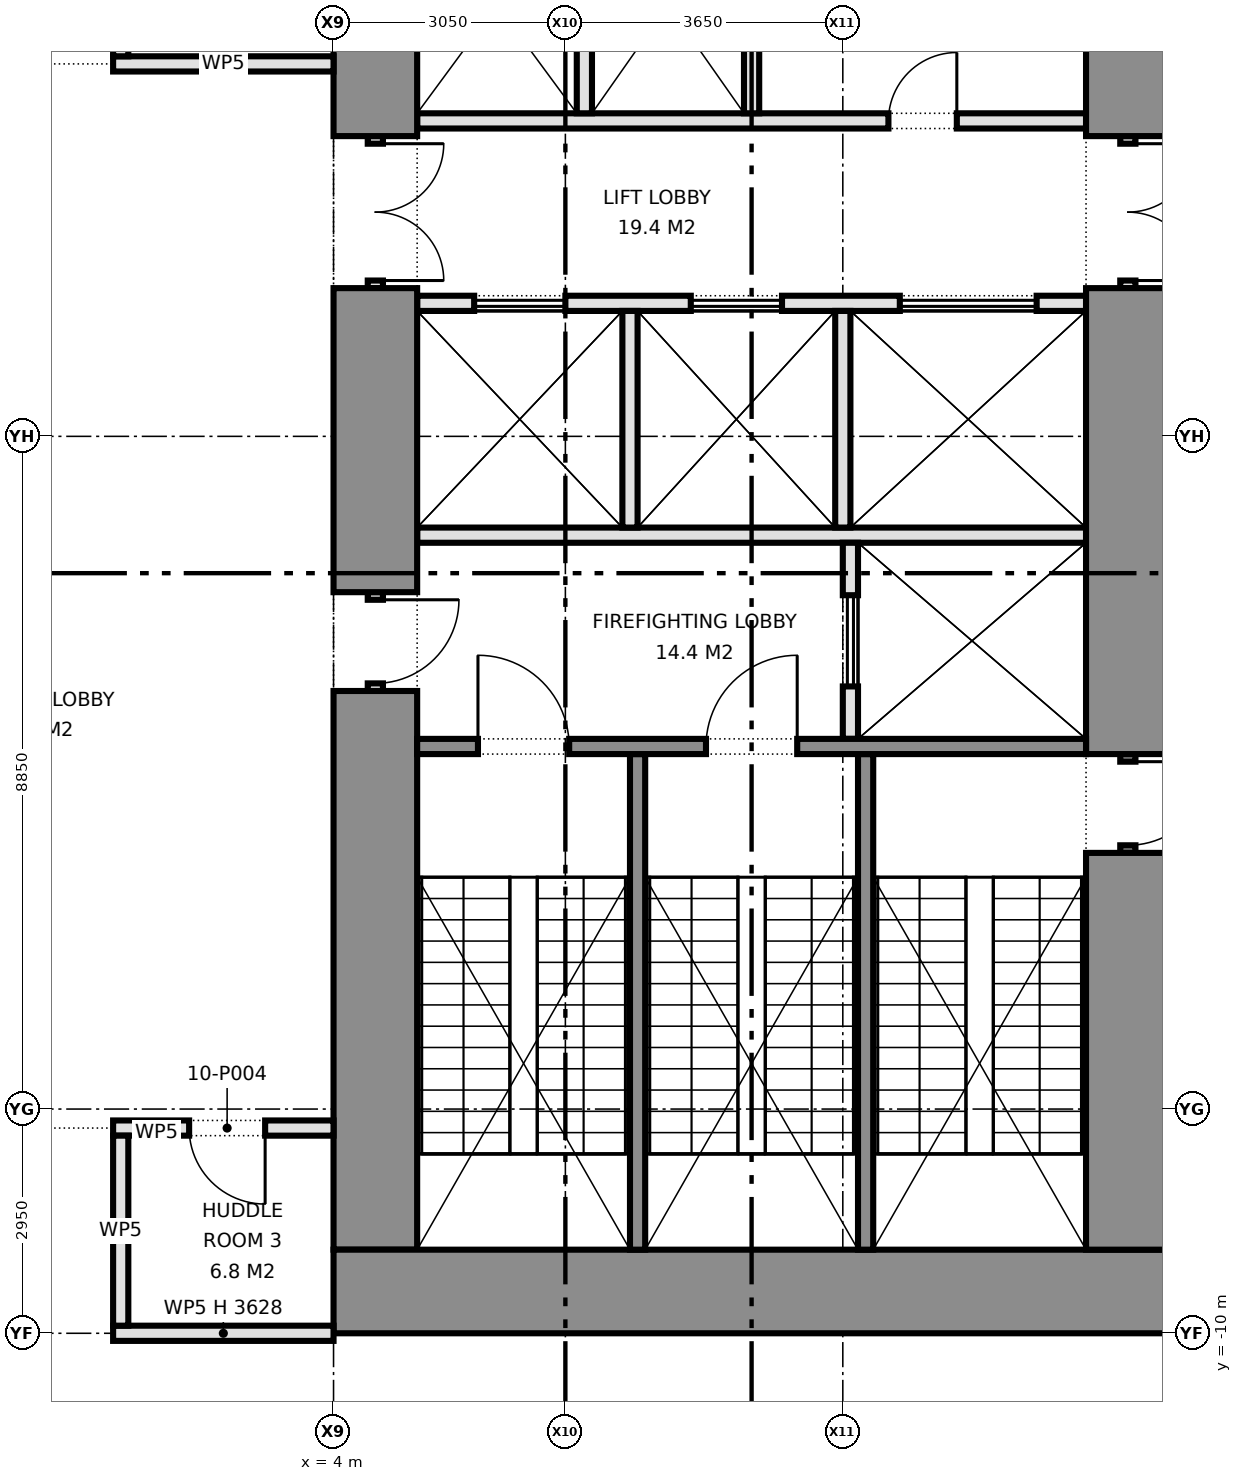
"""IFC4 building model, lengths in metres.
Left out: names, types, materials, properties, quantities, classifications, styles, units other than length and angle.
Written with IfcOpenShell. Run it as: python <this file> out.ifc"""

import sys

from ifc_helpers import new_model, si_unit, direction, frame, frame_2d, origin, place, context, subcontext, project, spatial, rectangle, extrude, element, fill, save


model = new_model("IFC4")
c1 = context("Model", 3, precision=1e-05, world=origin(), true_north=direction((0.0, 1.0)))
c2 = subcontext(c1, "Body", "Model", "MODEL_VIEW")
j1 = project(units=[si_unit("LENGTHUNIT", "METRE"), si_unit("PLANEANGLEUNIT", "RADIAN")], contexts=[c1])
p1 = place(None, origin())
s1 = spatial("IfcSite", under=j1, at=p1, CompositionType="ELEMENT")
p2 = place(p1, origin())
s2 = spatial("IfcBuilding", under=s1, at=p2, CompositionType="ELEMENT")
p3 = place(p2, frame((0.0, 0.0, 44.9)))
s3 = spatial("IfcBuildingStorey", under=s2, at=p3, CompositionType="ELEMENT", Elevation=44.9)
p4 = place(p3, frame((15.0, -9.45, 0.0), z_axis=(0.0, 0.0, 1.0), x_axis=(-1.0, 0.0, 0.0)))
e1 = element("IfcWall", 1, at=p4, inside=s3, PredefinedType="SHEAR", context=c2, shape_type="SweptSolid", body=[
    extrude(rectangle(XDim=11.0, YDim=1.1, at=frame_2d((5.5, 0.0))), origin(), (0.0, 0.0, 1.0), 4.575),
])
p5 = place(p3, frame((14.45, 8.9, 0.0), z_axis=(0.0, 0.0, 1.0), x_axis=(0.0, -1.0, 0.0)))
e2 = element("IfcWall", 2, at=p5, inside=s3, PredefinedType="SHEAR", context=c2, shape_type="SweptSolid", body=[
    extrude(rectangle(XDim=3.15, YDim=1.1, at=frame_2d((1.575, 0.0))), origin(), (0.0, 0.0, 1.0), 4.575),
])
p6 = place(p3, frame((14.45, 5.75, 0.0), z_axis=(0.0, 0.0, 1.0), x_axis=(0.0, -1.0, 0.0)))
e3 = element("IfcWall", 3, at=p6, inside=s3, PredefinedType="PARTITIONING", context=c2, shape_type="SweptSolid", body=[
    extrude(rectangle(XDim=2.0, YDim=0.2, at=frame_2d((1.0, 0.0))), origin(), (0.0, 0.0, 1.0), 2.4),
])
p7 = place(p6, frame((0.1, 0.0, 0.0)))
e4 = element("IfcOpeningElement", 4, at=p7, cuts=e3, PredefinedType="OPENING", context=c2, shape_type="SweptSolid", body=[
    extrude(rectangle(XDim=1.8, YDim=2.1, at=frame_2d((0.9, 1.05))), frame((0.0, 0.11, 0.0), z_axis=(0.0, -1.0, 0.0), x_axis=(1.0, 0.0, 0.0)), (0.0, 0.0, 1.0), 0.22),
])
p8 = place(p3, frame((14.45, 3.75, 0.0), z_axis=(0.0, 0.0, 1.0), x_axis=(0.0, -1.0, 0.0)))
e5 = element("IfcWall", 5, at=p8, inside=s3, PredefinedType="SHEAR", context=c2, shape_type="SweptSolid", body=[
    extrude(rectangle(XDim=6.13, YDim=1.1, at=frame_2d((3.065, 0.0))), origin(), (0.0, 0.0, 1.0), 4.575),
])
p9 = place(p3, frame((14.45, -2.38, 0.0), z_axis=(0.0, 0.0, 1.0), x_axis=(0.0, -1.0, 0.0)))
e6 = element("IfcWall", 6, at=p9, inside=s3, PredefinedType="SHEAR", context=c2, shape_type="SweptSolid", body=[
    extrude(rectangle(XDim=1.3, YDim=0.2, at=frame_2d((0.65, 0.0))), origin(), (0.0, 0.0, 1.0), 2.4),
])
p10 = place(p9, frame((0.1, 0.0, 0.0)))
e7 = element("IfcOpeningElement", 7, at=p10, cuts=e6, PredefinedType="OPENING", context=c2, shape_type="SweptSolid", body=[
    extrude(rectangle(XDim=1.1, YDim=2.1, at=frame_2d((0.55, 1.05))), frame((0.0, 0.11, 0.0), z_axis=(0.0, -1.0, 0.0), x_axis=(1.0, 0.0, 0.0)), (0.0, 0.0, 1.0), 0.22),
])
p11 = place(p3, frame((14.45, -3.68, 0.0), z_axis=(0.0, 0.0, 1.0), x_axis=(0.0, -1.0, 0.0)))
e8 = element("IfcWall", 8, at=p11, inside=s3, PredefinedType="SHEAR", context=c2, shape_type="SweptSolid", body=[
    extrude(rectangle(XDim=5.22, YDim=1.1, at=frame_2d((2.61, 0.0))), origin(), (0.0, 0.0, 1.0), 4.575),
])
p12 = place(p3, frame((4.55, 8.9, 0.0), z_axis=(0.0, 0.0, 1.0), x_axis=(0.0, -1.0, 0.0)))
e9 = element("IfcWall", 9, at=p12, inside=s3, PredefinedType="SHEAR", context=c2, shape_type="SweptSolid", body=[
    extrude(rectangle(XDim=3.15, YDim=1.1, at=frame_2d((1.575, 0.0))), origin(), (0.0, 0.0, 1.0), 4.575),
])
p13 = place(p3, frame((4.55, 5.75, 0.0), z_axis=(0.0, 0.0, 1.0), x_axis=(0.0, -1.0, 0.0)))
e10 = element("IfcWall", 10, at=p13, inside=s3, PredefinedType="PARTITIONING", context=c2, shape_type="SweptSolid", body=[
    extrude(rectangle(XDim=2.0, YDim=0.2, at=frame_2d((1.0, 0.0))), origin(), (0.0, 0.0, 1.0), 2.4),
])
p14 = place(p13, frame((0.1, 0.0, 0.0)))
e11 = element("IfcOpeningElement", 11, at=p14, cuts=e10, PredefinedType="OPENING", context=c2, shape_type="SweptSolid", body=[
    extrude(rectangle(XDim=1.8, YDim=2.1, at=frame_2d((0.9, 1.05))), frame((0.0, 0.11, 0.0), z_axis=(0.0, -1.0, 0.0), x_axis=(1.0, 0.0, 0.0)), (0.0, 0.0, 1.0), 0.22),
])
p15 = place(p3, frame((4.55, 3.75, 0.0), z_axis=(0.0, 0.0, 1.0), x_axis=(0.0, -1.0, 0.0)))
e12 = element("IfcWall", 12, at=p15, inside=s3, PredefinedType="SHEAR", context=c2, shape_type="SweptSolid", body=[
    extrude(rectangle(XDim=4.0, YDim=1.1, at=frame_2d((2.0, 0.0))), origin(), (0.0, 0.0, 1.0), 4.575),
])
p16 = place(p3, frame((4.55, -0.25, 0.0), z_axis=(0.0, 0.0, 1.0), x_axis=(0.0, -1.0, 0.0)))
e13 = element("IfcWall", 13, at=p16, inside=s3, PredefinedType="PARTITIONING", context=c2, shape_type="SweptSolid", body=[
    extrude(rectangle(XDim=1.3, YDim=0.2, at=frame_2d((0.65, 0.0))), origin(), (0.0, 0.0, 1.0), 2.4),
])
p17 = place(p16, frame((0.1, 0.0, 0.0)))
e14 = element("IfcOpeningElement", 14, at=p17, cuts=e13, PredefinedType="OPENING", context=c2, shape_type="SweptSolid", body=[
    extrude(rectangle(XDim=1.1, YDim=2.1, at=frame_2d((0.55, 1.05))), frame((0.0, 0.11, 0.0), z_axis=(0.0, -1.0, 0.0), x_axis=(1.0, 0.0, 0.0)), (0.0, 0.0, 1.0), 0.22),
])
p18 = place(p3, frame((4.55, -1.55, 0.0), z_axis=(0.0, 0.0, 1.0), x_axis=(0.0, -1.0, 0.0)))
e15 = element("IfcWall", 15, at=p18, inside=s3, PredefinedType="SHEAR", context=c2, shape_type="SweptSolid", body=[
    extrude(rectangle(XDim=7.35, YDim=1.1, at=frame_2d((3.675, 0.0))), origin(), (0.0, 0.0, 1.0), 4.575),
])
p19 = place(p3, frame((13.9, 5.95, 0.0), z_axis=(0.0, 0.0, 1.0), x_axis=(-1.0, 0.0, 0.0)))
e16 = element("IfcWall", 16, at=p19, inside=s3, PredefinedType="PARTITIONING", context=c2, shape_type="SweptSolid", body=[
    extrude(rectangle(XDim=8.8, YDim=0.2, at=frame_2d((4.4, 0.0))), origin(), (0.0, 0.0, 1.0), 4.575),
])
p20 = place(p19, frame((1.7, 0.0, 0.0)))
e17 = element("IfcOpeningElement", 17, at=p20, cuts=e16, PredefinedType="OPENING", context=c2, shape_type="SweptSolid", body=[
    extrude(rectangle(XDim=0.9, YDim=2.1, at=frame_2d((0.45, 1.05))), frame((0.0, 0.11, 0.0), z_axis=(0.0, -1.0, 0.0), x_axis=(1.0, 0.0, 0.0)), (0.0, 0.0, 1.0), 0.22),
])
p21 = place(p3, frame((13.9, 3.55, 0.0), z_axis=(0.0, 0.0, 1.0), x_axis=(-1.0, 0.0, 0.0)))
e18 = element("IfcWall", 18, at=p21, inside=s3, PredefinedType="PARTITIONING", context=c2, shape_type="SweptSolid", body=[
    extrude(rectangle(XDim=8.8, YDim=0.2, at=frame_2d((4.4, 0.0))), origin(), (0.0, 0.0, 1.0), 4.575),
])
p22 = place(p21, frame((0.65, 0.0, 0.0)))
e19 = element("IfcOpeningElement", 19, at=p22, cuts=e18, PredefinedType="OPENING", context=c2, shape_type="SweptSolid", body=[
    extrude(rectangle(XDim=1.8, YDim=2.1, at=frame_2d((0.9, 1.05))), frame((0.0, 0.11, 0.0), z_axis=(0.0, -1.0, 0.0), x_axis=(1.0, 0.0, 0.0)), (0.0, 0.0, 1.0), 0.22),
])
p23 = place(p21, frame((4.0, 0.0, 0.0)))
e20 = element("IfcOpeningElement", 20, at=p23, cuts=e18, PredefinedType="OPENING", context=c2, shape_type="SweptSolid", body=[
    extrude(rectangle(XDim=1.2, YDim=2.1, at=frame_2d((0.6, 1.05))), frame((0.0, 0.11, 0.0), z_axis=(0.0, -1.0, 0.0), x_axis=(1.0, 0.0, 0.0)), (0.0, 0.0, 1.0), 0.22),
])
p24 = place(p21, frame((6.85, 0.0, 0.0)))
e21 = element("IfcOpeningElement", 21, at=p24, cuts=e18, PredefinedType="OPENING", context=c2, shape_type="SweptSolid", body=[
    extrude(rectangle(XDim=1.2, YDim=2.1, at=frame_2d((0.6, 1.05))), frame((0.0, 0.11, 0.0), z_axis=(0.0, -1.0, 0.0), x_axis=(1.0, 0.0, 0.0)), (0.0, 0.0, 1.0), 0.22),
])
p25 = place(p3, frame((13.9, 0.5, 0.0), z_axis=(0.0, 0.0, 1.0), x_axis=(-1.0, 0.0, 0.0)))
e22 = element("IfcWall", 22, at=p25, inside=s3, PredefinedType="PARTITIONING", context=c2, shape_type="SweptSolid", body=[
    extrude(rectangle(XDim=8.8, YDim=0.2, at=frame_2d((4.4, 0.0))), origin(), (0.0, 0.0, 1.0), 4.575),
])
p26 = place(p3, frame((10.8, 0.4, 0.0), z_axis=(0.0, 0.0, 1.0), x_axis=(0.0, -1.0, 0.0)))
e23 = element("IfcWall", 23, at=p26, inside=s3, PredefinedType="PARTITIONING", context=c2, shape_type="SweptSolid", body=[
    extrude(rectangle(XDim=2.58, YDim=0.2, at=frame_2d((1.29, 0.0))), origin(), (0.0, 0.0, 1.0), 4.575),
])
p27 = place(p26, frame((0.69, 0.0, 0.0)))
e24 = element("IfcOpeningElement", 24, at=p27, cuts=e23, PredefinedType="OPENING", context=c2, shape_type="SweptSolid", body=[
    extrude(rectangle(XDim=1.2, YDim=2.1, at=frame_2d((0.6, 1.05))), frame((0.0, 0.11, 0.0), z_axis=(0.0, -1.0, 0.0), x_axis=(1.0, 0.0, 0.0)), (0.0, 0.0, 1.0), 0.22),
])
p28 = place(p3, frame((13.9, -2.28, 0.0), z_axis=(0.0, 0.0, 1.0), x_axis=(-1.0, 0.0, 0.0)))
e25 = element("IfcWall", 25, at=p28, inside=s3, PredefinedType="SHEAR", context=c2, shape_type="SweptSolid", body=[
    extrude(rectangle(XDim=8.8, YDim=0.2, at=frame_2d((4.4, 0.0))), origin(), (0.0, 0.0, 1.0), 4.575),
])
p29 = place(p28, frame((3.8, 0.0, 0.0)))
e26 = element("IfcOpeningElement", 26, at=p29, cuts=e25, PredefinedType="OPENING", context=c2, shape_type="SweptSolid", body=[
    extrude(rectangle(XDim=1.2, YDim=2.1, at=frame_2d((0.6, 1.05))), frame((0.0, 0.11, 0.0), z_axis=(0.0, -1.0, 0.0), x_axis=(1.0, 0.0, 0.0)), (0.0, 0.0, 1.0), 0.22),
])
p30 = place(p28, frame((6.8, 0.0, 0.0)))
e27 = element("IfcOpeningElement", 27, at=p30, cuts=e25, PredefinedType="OPENING", context=c2, shape_type="SweptSolid", body=[
    extrude(rectangle(XDim=1.2, YDim=2.1, at=frame_2d((0.6, 1.05))), frame((0.0, 0.11, 0.0), z_axis=(0.0, -1.0, 0.0), x_axis=(1.0, 0.0, 0.0)), (0.0, 0.0, 1.0), 0.22),
])
for number, where, z_axis, x_axis in (
    (28, (11.0, -2.38, 0.0), (0.0, 0.0, 1.0), (0.0, -1.0, 0.0)),
    (29, (8.0, -2.38, 0.0), (0.0, 0.0, 1.0), (0.0, -1.0, 0.0)),
):
    element("IfcWall", number, at=place(p3, frame(where, z_axis=z_axis, x_axis=x_axis)), inside=s3, PredefinedType="SHEAR", context=c2, shape_type="SweptSolid", body=[
        extrude(rectangle(XDim=6.52, YDim=0.2, at=frame_2d((3.26, 0.0))), origin(), (0.0, 0.0, 1.0), 4.575),
    ])
for number, where, z_axis, x_axis in (
    (30, (9.5, 8.9, 0.0), (0.0, 0.0, 1.0), (0.0, -1.0, 0.0)),
    (31, (7.3, 8.9, 0.0), (0.0, 0.0, 1.0), (0.0, -1.0, 0.0)),
    (32, (10.7, 3.45, 0.0), (0.0, 0.0, 1.0), (0.0, -1.0, 0.0)),
    (33, (7.9, 3.45, 0.0), (0.0, 0.0, 1.0), (0.0, -1.0, 0.0)),
):
    element("IfcWall", number, at=place(p3, frame(where, z_axis=z_axis, x_axis=x_axis)), inside=s3, PredefinedType="PARTITIONING", context=c2, shape_type="SweptSolid", body=[
        extrude(rectangle(XDim=2.85, YDim=0.2, at=frame_2d((1.425, 0.0))), origin(), (0.0, 0.0, 1.0), 4.575),
    ])
p31 = place(p3, frame((1.1, -10.0, 0.0), z_axis=(0.0, 0.0, 1.0), x_axis=(1.0, 0.0, 0.0)))
e34 = element("IfcWall", 34, at=p31, inside=s3, PredefinedType="PARTITIONING", context=c2, shape_type="SweptSolid", body=[
    extrude(rectangle(XDim=2.9, YDim=0.2, at=frame_2d((1.45, 0.0))), origin(), (0.0, 0.0, 1.0), 3.628),
])
p32 = place(p3, frame((1.1, -7.3, 0.0), z_axis=(0.0, 0.0, 1.0), x_axis=(1.0, 0.0, 0.0)))
e35 = element("IfcWall", 35, at=p32, inside=s3, PredefinedType="PARTITIONING", context=c2, shape_type="SweptSolid", body=[
    extrude(rectangle(XDim=2.9, YDim=0.2, at=frame_2d((1.45, 0.0))), origin(), (0.0, 0.0, 1.0), 4.575),
])
p33 = place(p32, frame((1.0, 0.0, 0.0)))
e36 = element("IfcOpeningElement", 36, at=p33, cuts=e35, PredefinedType="OPENING", context=c2, shape_type="SweptSolid", body=[
    extrude(rectangle(XDim=1.0, YDim=2.1, at=frame_2d((0.5, 1.05))), frame((0.0, 0.11, 0.0), z_axis=(0.0, -1.0, 0.0), x_axis=(1.0, 0.0, 0.0)), (0.0, 0.0, 1.0), 0.22),
])
p34 = place(p3, frame((1.1, 6.7, 0.0), z_axis=(0.0, 0.0, 1.0), x_axis=(1.0, 0.0, 0.0)))
e37 = element("IfcWall", 37, at=p34, inside=s3, PredefinedType="PARTITIONING", context=c2, shape_type="SweptSolid", body=[
    extrude(rectangle(XDim=2.9, YDim=0.2, at=frame_2d((1.45, 0.0))), origin(), (0.0, 0.0, 1.0), 4.575),
])
p35 = place(p3, frame((1.2, -9.9, 0.0), z_axis=(0.0, 0.0, 1.0), x_axis=(0.0, 1.0, 0.0)))
e38 = element("IfcWall", 38, at=p35, inside=s3, PredefinedType="PARTITIONING", context=c2, shape_type="SweptSolid", body=[
    extrude(rectangle(XDim=2.5, YDim=0.2, at=frame_2d((1.25, 0.0))), origin(), (0.0, 0.0, 1.0), 4.575),
])
p36 = place(p3, frame((1.2, 6.8, 0.0), z_axis=(0.0, 0.0, 1.0), x_axis=(0.0, 1.0, 0.0)))
e39 = element("IfcWall", 39, at=p36, inside=s3, PredefinedType="PARTITIONING", context=c2, shape_type="SweptSolid", body=[
    extrude(rectangle(XDim=3.1, YDim=0.2, at=frame_2d((1.55, 0.0))), origin(), (0.0, 0.0, 1.0), 4.575),
])
p37 = place(p36, frame((1.05, 0.0, 0.0)))
e40 = element("IfcOpeningElement", 40, at=p37, cuts=e39, PredefinedType="OPENING", context=c2, shape_type="SweptSolid", body=[
    extrude(rectangle(XDim=1.0, YDim=2.1, at=frame_2d((0.5, 1.05))), frame((0.0, 0.11, 0.0), z_axis=(0.0, -1.0, 0.0), x_axis=(1.0, 0.0, 0.0)), (0.0, 0.0, 1.0), 0.22),
])
p38 = place(p7, origin())
e41 = element("IfcDoor", 41, at=p38, inside=s3, OperationType="DOUBLE_DOOR_SINGLE_SWING", PredefinedType="DOOR", context=c2, shape_type="SweptSolid", body=[
    extrude(rectangle(XDim=1.8, YDim=2.1, at=frame_2d((0.9, 1.05))), frame((0.0, 0.025, 0.0), z_axis=(0.0, -1.0, 0.0), x_axis=(1.0, 0.0, 0.0)), (0.0, 0.0, 1.0), 0.05),
])
fill(e4, e41)
p39 = place(p10, origin())
e42 = element("IfcDoor", 42, at=p39, inside=s3, OperationType="SINGLE_SWING_LEFT", PredefinedType="DOOR", context=c2, shape_type="SweptSolid", body=[
    extrude(rectangle(XDim=1.1, YDim=2.1, at=frame_2d((0.55, 1.05))), frame((0.0, 0.025, 0.0), z_axis=(0.0, -1.0, 0.0), x_axis=(1.0, 0.0, 0.0)), (0.0, 0.0, 1.0), 0.05),
])
fill(e7, e42)
p40 = place(p14, origin())
e43 = element("IfcDoor", 43, at=p40, inside=s3, OperationType="DOUBLE_DOOR_SINGLE_SWING", PredefinedType="DOOR", context=c2, shape_type="SweptSolid", body=[
    extrude(rectangle(XDim=1.8, YDim=2.1, at=frame_2d((0.9, 1.05))), frame((0.0, 0.025, 0.0), z_axis=(0.0, -1.0, 0.0), x_axis=(1.0, 0.0, 0.0)), (0.0, 0.0, 1.0), 0.05),
])
fill(e11, e43)
p41 = place(p17, origin())
e44 = element("IfcDoor", 44, at=p41, inside=s3, OperationType="SINGLE_SWING_LEFT", PredefinedType="DOOR", context=c2, shape_type="SweptSolid", body=[
    extrude(rectangle(XDim=1.1, YDim=2.1, at=frame_2d((0.55, 1.05))), frame((0.0, 0.025, 0.0), z_axis=(0.0, -1.0, 0.0), x_axis=(1.0, 0.0, 0.0)), (0.0, 0.0, 1.0), 0.05),
])
fill(e14, e44)
p42 = place(p22, origin())
e45 = element("IfcDoor", 45, at=p42, inside=s3, OperationType="DOUBLE_DOOR_SLIDING", PredefinedType="DOOR", context=c2, shape_type="SweptSolid", body=[
    extrude(rectangle(XDim=1.8, YDim=2.1, at=frame_2d((0.9, 1.05))), frame((0.0, 0.025, 0.0), z_axis=(0.0, -1.0, 0.0), x_axis=(1.0, 0.0, 0.0)), (0.0, 0.0, 1.0), 0.05),
])
fill(e19, e45)
p43 = place(p23, origin())
e46 = element("IfcDoor", 46, at=p43, inside=s3, OperationType="DOUBLE_DOOR_SLIDING", PredefinedType="DOOR", context=c2, shape_type="SweptSolid", body=[
    extrude(rectangle(XDim=1.2, YDim=2.1, at=frame_2d((0.6, 1.05))), frame((0.0, 0.025, 0.0), z_axis=(0.0, -1.0, 0.0), x_axis=(1.0, 0.0, 0.0)), (0.0, 0.0, 1.0), 0.05),
])
fill(e20, e46)
p44 = place(p24, origin())
e47 = element("IfcDoor", 47, at=p44, inside=s3, OperationType="DOUBLE_DOOR_SLIDING", PredefinedType="DOOR", context=c2, shape_type="SweptSolid", body=[
    extrude(rectangle(XDim=1.2, YDim=2.1, at=frame_2d((0.6, 1.05))), frame((0.0, 0.025, 0.0), z_axis=(0.0, -1.0, 0.0), x_axis=(1.0, 0.0, 0.0)), (0.0, 0.0, 1.0), 0.05),
])
fill(e21, e47)
p45 = place(p27, origin())
e48 = element("IfcDoor", 48, at=p45, inside=s3, OperationType="DOUBLE_DOOR_SLIDING", PredefinedType="DOOR", context=c2, shape_type="SweptSolid", body=[
    extrude(rectangle(XDim=1.2, YDim=2.1, at=frame_2d((0.6, 1.05))), frame((0.0, 0.025, 0.0), z_axis=(0.0, -1.0, 0.0), x_axis=(1.0, 0.0, 0.0)), (0.0, 0.0, 1.0), 0.05),
])
fill(e24, e48)
p46 = place(p20, frame((0.9, 0.0, 0.0), z_axis=(0.0, 0.0, 1.0), x_axis=(-1.0, 0.0, 0.0)))
e49 = element("IfcDoor", 49, at=p46, inside=s3, OperationType="SINGLE_SWING_RIGHT", PredefinedType="DOOR", context=c2, shape_type="SweptSolid", body=[
    extrude(rectangle(XDim=0.9, YDim=2.1, at=frame_2d((0.45, 1.05))), frame((0.0, 0.025, 0.0), z_axis=(0.0, -1.0, 0.0), x_axis=(1.0, 0.0, 0.0)), (0.0, 0.0, 1.0), 0.05),
])
fill(e17, e49)
p47 = place(p29, frame((1.2, 0.0, 0.0), z_axis=(0.0, 0.0, 1.0), x_axis=(-1.0, 0.0, 0.0)))
e50 = element("IfcDoor", 50, at=p47, inside=s3, OperationType="SINGLE_SWING_RIGHT", PredefinedType="DOOR", context=c2, shape_type="SweptSolid", body=[
    extrude(rectangle(XDim=1.2, YDim=2.1, at=frame_2d((0.6, 1.05))), frame((0.0, 0.025, 0.0), z_axis=(0.0, -1.0, 0.0), x_axis=(1.0, 0.0, 0.0)), (0.0, 0.0, 1.0), 0.05),
])
fill(e26, e50)
p48 = place(p30, frame((1.2, 0.0, 0.0), z_axis=(0.0, 0.0, 1.0), x_axis=(-1.0, 0.0, 0.0)))
e51 = element("IfcDoor", 51, at=p48, inside=s3, OperationType="SINGLE_SWING_LEFT", PredefinedType="DOOR", context=c2, shape_type="SweptSolid", body=[
    extrude(rectangle(XDim=1.2, YDim=2.1, at=frame_2d((0.6, 1.05))), frame((0.0, 0.025, 0.0), z_axis=(0.0, -1.0, 0.0), x_axis=(1.0, 0.0, 0.0)), (0.0, 0.0, 1.0), 0.05),
])
fill(e27, e51)
p49 = place(p33, frame((1.0, 0.0, 0.0), z_axis=(0.0, 0.0, 1.0), x_axis=(-1.0, 0.0, 0.0)))
e52 = element("IfcDoor", 52, at=p49, inside=s3, OperationType="SINGLE_SWING_LEFT", PredefinedType="DOOR", context=c2, shape_type="SweptSolid", body=[
    extrude(rectangle(XDim=1.0, YDim=2.1, at=frame_2d((0.5, 1.05))), frame((0.0, 0.025, 0.0), z_axis=(0.0, -1.0, 0.0), x_axis=(1.0, 0.0, 0.0)), (0.0, 0.0, 1.0), 0.05),
])
fill(e36, e52)
save(model, sys.argv[1])
